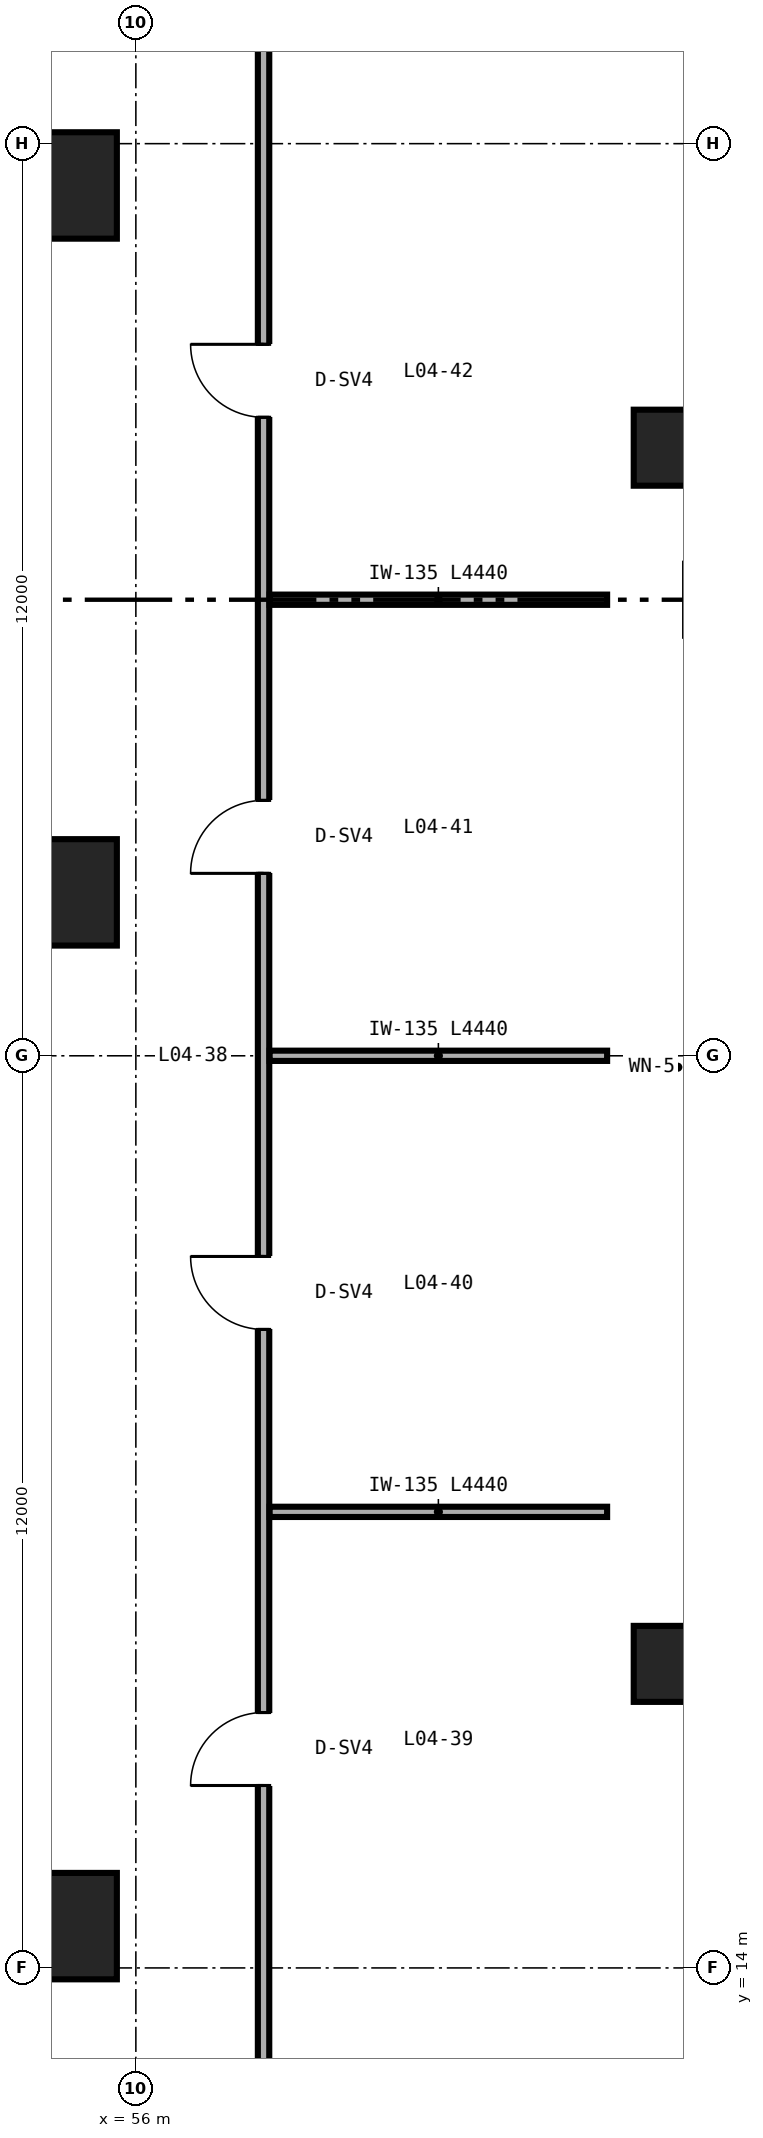
"""IFC4 building model, lengths in metres.
Left out: names, types, materials, properties, quantities, classifications, styles, units other than length and angle.
Written with IfcOpenShell. Run it as: python <this file> out.ifc"""

import sys

from ifc_helpers import new_model, si_unit, direction, frame, frame_2d, origin, origin_2d, place, context, subcontext, project, spatial, rectangle, extrude, source, transform, mapped, element, fill, save


model = new_model("IFC4")
c1 = context("Model", 3, precision=1e-05, world=origin(), true_north=direction((0.0, 1.0)))
c2 = subcontext(c1, "Body", "Model", "MODEL_VIEW")
j1 = project(units=[si_unit("LENGTHUNIT", "METRE"), si_unit("PLANEANGLEUNIT", "RADIAN")], contexts=[c1])
p1 = place(None, origin())
s1 = spatial("IfcSite", under=j1, at=p1, CompositionType="ELEMENT")
p2 = place(p1, origin())
s2 = spatial("IfcBuilding", under=s1, at=p2, CompositionType="ELEMENT")
p3 = place(p2, frame((0.0, 0.0, 19.2)))
s3 = spatial("IfcBuildingStorey", under=s2, at=p3, CompositionType="ELEMENT", Elevation=19.2)
m1 = source(origin(), c2, "Body", "SweptSolid", [
    extrude(rectangle(XDim=1.0, YDim=1.0, at=origin_2d()), origin(), (0.0, 0.0, 1.0), 4.48),
])
for number, where, z_axis, x_axis in (
    (1, (63.05, 18.0, 0.0), (0.0, 0.0, 1.0), (1.0, 0.0, 0.0)),
    (2, (63.05, 34.0, 0.0), (0.0, 0.0, 1.0), (1.0, 0.0, 0.0)),
):
    element("IfcColumn", number, at=place(p3, frame(where, z_axis=z_axis, x_axis=x_axis)), inside=s3, PredefinedType="COLUMN", context=c2, shape_type="MappedRepresentation", body=[
        mapped(m1, transform((0.0, 0.0, 0.0), scale=1.0)),
    ])
m2 = source(origin(), c2, "Body", "SweptSolid", [
    extrude(rectangle(XDim=1.4, YDim=1.4, at=origin_2d()), origin(), (0.0, 0.0, 1.0), 4.48),
])
for number, where, z_axis, x_axis in (
    (3, (55.05, 14.55, 0.0), (0.0, 0.0, 1.0), (1.0, 0.0, 0.0)),
    (4, (55.05, 28.15, 0.0), (0.0, 0.0, 1.0), (1.0, 0.0, 0.0)),
    (5, (55.05, 37.45, 0.0), (0.0, 0.0, 1.0), (1.0, 0.0, 0.0)),
):
    element("IfcColumn", number, at=place(p3, frame(where, z_axis=z_axis, x_axis=x_axis)), inside=s3, PredefinedType="COLUMN", context=c2, shape_type="MappedRepresentation", body=[
        mapped(m2, transform((0.0, 0.0, 0.0), scale=1.0)),
    ])
p4 = place(p3, frame((57.68, 12.6, 0.0), z_axis=(0.0, 0.0, 1.0), x_axis=(0.0, 1.0, 0.0)))
e6 = element("IfcWall", 6, at=p4, inside=s3, PredefinedType="PARTITIONING", context=c2, shape_type="SweptSolid", body=[
    extrude(rectangle(XDim=31.2, YDim=0.15, at=frame_2d((15.6, 0.0))), origin(), (0.0, 0.0, 1.0), 4.48),
])
p5 = place(p4, frame((3.8, 0.0, 0.0)))
e7 = element("IfcOpeningElement", 7, at=p5, cuts=e6, PredefinedType="OPENING", context=c2, shape_type="SweptSolid", body=[
    extrude(rectangle(XDim=0.96, YDim=2.15, at=frame_2d((0.48, 1.075))), frame((0.0, 0.085, 0.0), z_axis=(0.0, -1.0, 0.0), x_axis=(1.0, 0.0, 0.0)), (0.0, 0.0, 1.0), 0.17),
])
p6 = place(p4, frame((9.8, 0.0, 0.0)))
e8 = element("IfcOpeningElement", 8, at=p6, cuts=e6, PredefinedType="OPENING", context=c2, shape_type="SweptSolid", body=[
    extrude(rectangle(XDim=0.96, YDim=2.15, at=frame_2d((0.48, 1.075))), frame((0.0, 0.085, 0.0), z_axis=(0.0, -1.0, 0.0), x_axis=(1.0, 0.0, 0.0)), (0.0, 0.0, 1.0), 0.17),
])
p7 = place(p4, frame((15.8, 0.0, 0.0)))
e9 = element("IfcOpeningElement", 9, at=p7, cuts=e6, PredefinedType="OPENING", context=c2, shape_type="SweptSolid", body=[
    extrude(rectangle(XDim=0.96, YDim=2.15, at=frame_2d((0.48, 1.075))), frame((0.0, 0.085, 0.0), z_axis=(0.0, -1.0, 0.0), x_axis=(1.0, 0.0, 0.0)), (0.0, 0.0, 1.0), 0.17),
])
p8 = place(p4, frame((21.8, 0.0, 0.0)))
e10 = element("IfcOpeningElement", 10, at=p8, cuts=e6, PredefinedType="OPENING", context=c2, shape_type="SweptSolid", body=[
    extrude(rectangle(XDim=0.96, YDim=2.15, at=frame_2d((0.48, 1.075))), frame((0.0, 0.085, 0.0), z_axis=(0.0, -1.0, 0.0), x_axis=(1.0, 0.0, 0.0)), (0.0, 0.0, 1.0), 0.17),
])
for number, where, z_axis, x_axis in (
    (11, (57.76, 20.0, 0.0), (0.0, 0.0, 1.0), (1.0, 0.0, 0.0)),
    (12, (57.76, 26.0, 0.0), (0.0, 0.0, 1.0), (1.0, 0.0, 0.0)),
    (13, (57.76, 32.0, 0.0), (0.0, 0.0, 1.0), (1.0, 0.0, 0.0)),
):
    element("IfcWall", number, at=place(p3, frame(where, z_axis=z_axis, x_axis=x_axis)), inside=s3, PredefinedType="PARTITIONING", context=c2, shape_type="SweptSolid", body=[
        extrude(rectangle(XDim=4.44, YDim=0.135, at=frame_2d((2.22, 0.0))), origin(), (0.0, 0.0, 1.0), 4.48),
    ])
m3 = source(origin(), c2, "Body", "SweptSolid", [
    extrude(rectangle(XDim=0.96, YDim=2.15, at=frame_2d((0.48, 1.075))), frame((0.0, 0.025, 0.0), z_axis=(0.0, -1.0, 0.0), x_axis=(1.0, 0.0, 0.0)), (0.0, 0.0, 1.0), 0.05),
])
p9 = place(p5, origin())
e14 = element("IfcDoor", 14, at=p9, inside=s3, OperationType="SINGLE_SWING_LEFT", PredefinedType="DOOR", context=c2, shape_type="MappedRepresentation", body=[
    mapped(m3, transform((0.0, 0.0, 0.0), scale=1.0)),
])
fill(e7, e14)
p10 = place(p6, origin())
e15 = element("IfcDoor", 15, at=p10, inside=s3, OperationType="SINGLE_SWING_RIGHT", PredefinedType="DOOR", context=c2, shape_type="MappedRepresentation", body=[
    mapped(m3, transform((0.0, 0.0, 0.0), scale=1.0)),
])
fill(e8, e15)
p11 = place(p7, origin())
e16 = element("IfcDoor", 16, at=p11, inside=s3, OperationType="SINGLE_SWING_LEFT", PredefinedType="DOOR", context=c2, shape_type="MappedRepresentation", body=[
    mapped(m3, transform((0.0, 0.0, 0.0), scale=1.0)),
])
fill(e9, e16)
p12 = place(p8, origin())
e17 = element("IfcDoor", 17, at=p12, inside=s3, OperationType="SINGLE_SWING_RIGHT", PredefinedType="DOOR", context=c2, shape_type="MappedRepresentation", body=[
    mapped(m3, transform((0.0, 0.0, 0.0), scale=1.0)),
])
fill(e10, e17)
save(model, sys.argv[1])
